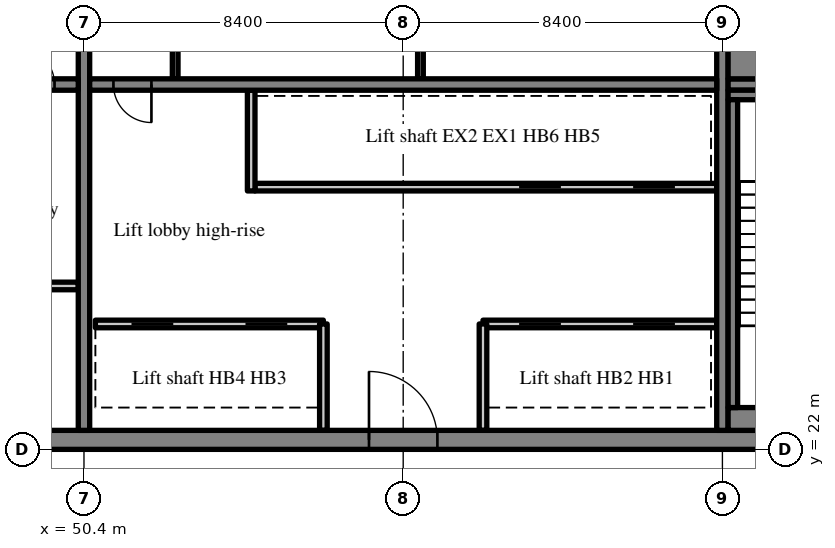
"""IFC4 building model, lengths in metres.
Left out: names, types, materials, properties, quantities, classifications, styles, units other than length and angle.
Written with IfcOpenShell. Run it as: python <this file> out.ifc"""

import sys

from ifc_helpers import new_model, si_unit, direction, frame, frame_2d, origin, place, context, subcontext, project, spatial, rectangle, extrude, source, transform, mapped, element, fill, save


model = new_model("IFC4")
c1 = context("Model", 3, precision=1e-05, world=origin(), true_north=direction((0.0, 1.0)))
c2 = subcontext(c1, "Body", "Model", "MODEL_VIEW")
j1 = project(units=[si_unit("LENGTHUNIT", "METRE"), si_unit("PLANEANGLEUNIT", "RADIAN")], contexts=[c1])
p1 = place(None, origin())
s1 = spatial("IfcSite", under=j1, at=p1, CompositionType="ELEMENT")
p2 = place(p1, origin())
s2 = spatial("IfcBuilding", under=s1, at=p2, CompositionType="ELEMENT")
p3 = place(p2, frame((0.0, 0.0, 277.7)))
s3 = spatial("IfcBuildingStorey", under=s2, at=p3, CompositionType="ELEMENT", Elevation=277.7)
m1 = source(origin(), c2, "Body", "SweptSolid", [
    extrude(rectangle(XDim=50.4, YDim=0.5, at=frame_2d((25.2, 0.0))), origin(), (0.0, 0.0, 1.0), 3.72),
])
p4 = place(p3, frame((25.2, 22.25, 0.0), z_axis=(0.0, 0.0, 1.0), x_axis=(1.0, 0.0, 0.0)))
e1 = element("IfcWall", 1, at=p4, inside=s3, PredefinedType="SHEAR", context=c2, shape_type="MappedRepresentation", body=[
    mapped(m1, transform((0.0, 0.0, 0.0), scale=1.0)),
])
m2 = source(origin(), c2, "Body", "SweptSolid", [
    extrude(rectangle(XDim=1.8, YDim=2.1, at=frame_2d((0.9, 1.05))), frame((0.0, 0.26, 0.0), z_axis=(0.0, -1.0, 0.0), x_axis=(1.0, 0.0, 0.0)), (0.0, 0.0, 1.0), 0.52),
])
p5 = place(p4, frame((15.9, 0.0, 0.0)))
e2 = element("IfcOpeningElement", 2, at=p5, cuts=e1, PredefinedType="OPENING", context=c2, shape_type="MappedRepresentation", body=[
    mapped(m2, transform((0.0, 0.0, 0.0), scale=1.0)),
])
m3 = source(origin(), c2, "Body", "SweptSolid", [
    extrude(rectangle(XDim=0.9, YDim=2.1, at=frame_2d((0.45, 1.05))), frame((0.0, 0.26, 0.0), z_axis=(0.0, -1.0, 0.0), x_axis=(1.0, 0.0, 0.0)), (0.0, 0.0, 1.0), 0.52),
])
p6 = place(p4, frame((21.525, 0.0, 0.0)))
e3 = element("IfcOpeningElement", 3, at=p6, cuts=e1, PredefinedType="OPENING", context=c2, shape_type="MappedRepresentation", body=[
    mapped(m3, transform((0.0, 0.0, 0.0), scale=1.0)),
])
p7 = place(p4, frame((32.7, 0.0, 0.0)))
e4 = element("IfcOpeningElement", 4, at=p7, cuts=e1, PredefinedType="OPENING", context=c2, shape_type="MappedRepresentation", body=[
    mapped(m2, transform((0.0, 0.0, 0.0), scale=1.0)),
])
m4 = source(origin(), c2, "Body", "SweptSolid", [
    extrude(rectangle(XDim=1.2, YDim=2.1, at=frame_2d((0.6, 1.05))), frame((0.0, 0.26, 0.0), z_axis=(0.0, -1.0, 0.0), x_axis=(1.0, 0.0, 0.0)), (0.0, 0.0, 1.0), 0.52),
])
p8 = place(p4, frame((6.5, 0.0, 0.0)))
e5 = element("IfcOpeningElement", 5, at=p8, cuts=e1, PredefinedType="OPENING", context=c2, shape_type="MappedRepresentation", body=[
    mapped(m4, transform((0.0, 0.0, 0.0), scale=1.0)),
])
p9 = place(p4, frame((47.975, 0.0, 0.0)))
e6 = element("IfcOpeningElement", 6, at=p9, cuts=e1, PredefinedType="OPENING", context=c2, shape_type="MappedRepresentation", body=[
    mapped(m4, transform((0.0, 0.0, 0.0), scale=1.0)),
])
m5 = source(origin(), c2, "Body", "SweptSolid", [
    extrude(rectangle(XDim=19.0, YDim=0.3, at=frame_2d((9.5, 0.0))), origin(), (0.0, 0.0, 1.0), 3.72),
])
p10 = place(p3, frame((50.4, 22.5, 0.0), z_axis=(0.0, 0.0, 1.0), x_axis=(0.0, 1.0, 0.0)))
e7 = element("IfcWall", 7, at=p10, inside=s3, PredefinedType="SHEAR", context=c2, shape_type="MappedRepresentation", body=[
    mapped(m5, transform((0.0, 0.0, 0.0), scale=1.0)),
])
m6 = source(origin(), c2, "Body", "SweptSolid", [
    extrude(rectangle(XDim=1.1, YDim=2.1, at=frame_2d((0.55, 1.05))), frame((0.0, 0.16, 0.0), z_axis=(0.0, -1.0, 0.0), x_axis=(1.0, 0.0, 0.0)), (0.0, 0.0, 1.0), 0.32),
])
p11 = place(p10, frame((12.95, 0.0, 0.0)))
e8 = element("IfcOpeningElement", 8, at=p11, cuts=e7, PredefinedType="OPENING", context=c2, shape_type="MappedRepresentation", body=[
    mapped(m6, transform((0.0, 0.0, 0.0), scale=1.0)),
])
p12 = place(p3, frame((67.2, 22.5, 0.0), z_axis=(0.0, 0.0, 1.0), x_axis=(0.0, 1.0, 0.0)))
e9 = element("IfcWall", 9, at=p12, inside=s3, PredefinedType="SHEAR", context=c2, shape_type="MappedRepresentation", body=[
    mapped(m5, transform((0.0, 0.0, 0.0), scale=1.0)),
])
m7 = source(origin(), c2, "Body", "SweptSolid", [
    extrude(rectangle(XDim=16.5, YDim=0.3, at=frame_2d((8.25, 0.0))), origin(), (0.0, 0.0, 1.0), 3.72),
])
p13 = place(p3, frame((33.75, 31.6, 0.0), z_axis=(0.0, 0.0, 1.0), x_axis=(1.0, 0.0, 0.0)))
e10 = element("IfcWall", 10, at=p13, inside=s3, PredefinedType="SHEAR", context=c2, shape_type="MappedRepresentation", body=[
    mapped(m7, transform((0.0, 0.0, 0.0), scale=1.0)),
])
m8 = source(origin(), c2, "Body", "SweptSolid", [
    extrude(rectangle(XDim=1.0, YDim=2.1, at=frame_2d((0.5, 1.05))), frame((0.0, 0.16, 0.0), z_axis=(0.0, -1.0, 0.0), x_axis=(1.0, 0.0, 0.0)), (0.0, 0.0, 1.0), 0.32),
])
p14 = place(p13, frame((14.875, 0.0, 0.0)))
e11 = element("IfcOpeningElement", 11, at=p14, cuts=e10, PredefinedType="OPENING", context=c2, shape_type="MappedRepresentation", body=[
    mapped(m8, transform((0.0, 0.0, 0.0), scale=1.0)),
])
p15 = place(p3, frame((50.55, 31.6, 0.0), z_axis=(0.0, 0.0, 1.0), x_axis=(1.0, 0.0, 0.0)))
e12 = element("IfcWall", 12, at=p15, inside=s3, PredefinedType="SHEAR", context=c2, shape_type="MappedRepresentation", body=[
    mapped(m7, transform((0.0, 0.0, 0.0), scale=1.0)),
])
p16 = place(p15, frame((0.625, 0.0, 0.0)))
e13 = element("IfcOpeningElement", 13, at=p16, cuts=e12, PredefinedType="OPENING", context=c2, shape_type="MappedRepresentation", body=[
    mapped(m8, transform((0.0, 0.0, 0.0), scale=1.0)),
])
m9 = source(origin(), c2, "Body", "SweptSolid", [
    extrude(rectangle(XDim=7.75, YDim=0.3, at=frame_2d((3.875, 0.0))), origin(), (0.0, 0.0, 1.0), 3.72),
])
p17 = place(p3, frame((67.35, 31.6, 0.0), z_axis=(0.0, 0.0, 1.0), x_axis=(1.0, 0.0, 0.0)))
e14 = element("IfcWall", 14, at=p17, inside=s3, PredefinedType="SHEAR", context=c2, shape_type="MappedRepresentation", body=[
    mapped(m9, transform((0.0, 0.0, 0.0), scale=1.0)),
])
p18 = place(p17, frame((5.875, 0.0, 0.0)))
e15 = element("IfcOpeningElement", 15, at=p18, cuts=e14, PredefinedType="OPENING", context=c2, shape_type="MappedRepresentation", body=[
    mapped(m6, transform((0.0, 0.0, 0.0), scale=1.0)),
])
m10 = source(origin(), c2, "Body", "SweptSolid", [
    extrude(rectangle(XDim=6.15, YDim=0.2, at=frame_2d((3.075, 0.0))), origin(), (0.0, 0.0, 1.0), 3.72),
])
p19 = place(p3, frame((44.1, 26.3, 0.0), z_axis=(0.0, 0.0, 1.0), x_axis=(1.0, 0.0, 0.0)))
e16 = element("IfcWall", 16, at=p19, inside=s3, PredefinedType="PARTITIONING", context=c2, shape_type="MappedRepresentation", body=[
    mapped(m10, transform((0.0, 0.0, 0.0), scale=1.0)),
])
m11 = source(origin(), c2, "Body", "SweptSolid", [
    extrude(rectangle(XDim=6.15, YDim=0.2, at=frame_2d((3.075, 0.0))), origin(), (0.0, 0.0, 1.0), 3.72),
])
p20 = place(p3, frame((67.05, 25.3, 0.0), z_axis=(0.0, 0.0, 1.0), x_axis=(-1.0, 0.0, 0.0)))
e17 = element("IfcWall", 17, at=p20, inside=s3, PredefinedType="SOLIDWALL", context=c2, shape_type="MappedRepresentation", body=[
    mapped(m11, transform((0.0, 0.0, 0.0), scale=1.0)),
])
m12 = source(origin(), c2, "Body", "SweptSolid", [
    extrude(rectangle(XDim=1.1, YDim=2.1, at=frame_2d((0.55, 1.05))), frame((0.0, 0.11, 0.0), z_axis=(0.0, -1.0, 0.0), x_axis=(1.0, 0.0, 0.0)), (0.0, 0.0, 1.0), 0.22),
])
p21 = place(p20, frame((1.1, 0.0, 0.0)))
e18 = element("IfcOpeningElement", 18, at=p21, cuts=e17, PredefinedType="OPENING", context=c2, shape_type="MappedRepresentation", body=[
    mapped(m12, transform((0.0, 0.0, 0.0), scale=1.0)),
])
p22 = place(p20, frame((4.1, 0.0, 0.0)))
e19 = element("IfcOpeningElement", 19, at=p22, cuts=e17, PredefinedType="OPENING", context=c2, shape_type="MappedRepresentation", body=[
    mapped(m12, transform((0.0, 0.0, 0.0), scale=1.0)),
])
m13 = source(origin(), c2, "Body", "SweptSolid", [
    extrude(rectangle(XDim=6.0, YDim=0.2, at=frame_2d((3.0, 0.0))), origin(), (0.0, 0.0, 1.0), 3.72),
])
p23 = place(p3, frame((56.7, 25.3, 0.0), z_axis=(0.0, 0.0, 1.0), x_axis=(-1.0, 0.0, 0.0)))
e20 = element("IfcWall", 20, at=p23, inside=s3, PredefinedType="SOLIDWALL", context=c2, shape_type="MappedRepresentation", body=[
    mapped(m13, transform((0.0, 0.0, 0.0), scale=1.0)),
])
p24 = place(p23, frame((0.95, 0.0, 0.0)))
e21 = element("IfcOpeningElement", 21, at=p24, cuts=e20, PredefinedType="OPENING", context=c2, shape_type="MappedRepresentation", body=[
    mapped(m12, transform((0.0, 0.0, 0.0), scale=1.0)),
])
p25 = place(p23, frame((3.95, 0.0, 0.0)))
e22 = element("IfcOpeningElement", 22, at=p25, cuts=e20, PredefinedType="OPENING", context=c2, shape_type="MappedRepresentation", body=[
    mapped(m12, transform((0.0, 0.0, 0.0), scale=1.0)),
])
m14 = source(origin(), c2, "Body", "SweptSolid", [
    extrude(rectangle(XDim=12.15, YDim=0.2, at=frame_2d((6.075, 0.0))), origin(), (0.0, 0.0, 1.0), 3.72),
])
p26 = place(p3, frame((67.05, 28.9, 0.0), z_axis=(0.0, 0.0, 1.0), x_axis=(-1.0, 0.0, 0.0)))
e23 = element("IfcWall", 23, at=p26, inside=s3, PredefinedType="SOLIDWALL", context=c2, shape_type="MappedRepresentation", body=[
    mapped(m14, transform((0.0, 0.0, 0.0), scale=1.0)),
])
p27 = place(p26, frame((1.1, 0.0, 0.0)))
e24 = element("IfcOpeningElement", 24, at=p27, cuts=e23, PredefinedType="OPENING", context=c2, shape_type="MappedRepresentation", body=[
    mapped(m12, transform((0.0, 0.0, 0.0), scale=1.0)),
])
p28 = place(p26, frame((4.1, 0.0, 0.0)))
e25 = element("IfcOpeningElement", 25, at=p28, cuts=e23, PredefinedType="OPENING", context=c2, shape_type="MappedRepresentation", body=[
    mapped(m12, transform((0.0, 0.0, 0.0), scale=1.0)),
])
m15 = source(origin(), c2, "Body", "SweptSolid", [
    extrude(rectangle(XDim=2.8, YDim=0.2, at=frame_2d((1.4, 0.0))), origin(), (0.0, 0.0, 1.0), 3.72),
])
for number, where, z_axis, x_axis in (
    (26, (60.9, 22.5, 0.0), (0.0, 0.0, 1.0), (0.0, 1.0, 0.0)),
    (27, (56.7, 22.5, 0.0), (0.0, 0.0, 1.0), (0.0, 1.0, 0.0)),
):
    element("IfcWall", number, at=place(p3, frame(where, z_axis=z_axis, x_axis=x_axis)), inside=s3, PredefinedType="SOLIDWALL", context=c2, shape_type="MappedRepresentation", body=[
        mapped(m15, transform((0.0, 0.0, 0.0), scale=1.0)),
    ])
m16 = source(origin(), c2, "Body", "SweptSolid", [
    extrude(rectangle(XDim=2.65, YDim=0.2, at=frame_2d((1.325, 0.0))), origin(), (0.0, 0.0, 1.0), 3.72),
])
p29 = place(p3, frame((54.8, 28.8, 0.0), z_axis=(0.0, 0.0, 1.0), x_axis=(0.0, 1.0, 0.0)))
e28 = element("IfcWall", 28, at=p29, inside=s3, PredefinedType="SOLIDWALL", context=c2, shape_type="MappedRepresentation", body=[
    mapped(m16, transform((0.0, 0.0, 0.0), scale=1.0)),
])
m17 = source(origin(), c2, "Body", "SweptSolid", [
    extrude(rectangle(XDim=3.25, YDim=0.15, at=frame_2d((1.625, 0.0))), origin(), (0.0, 0.0, 1.0), 3.72),
])
for number, where, z_axis, x_axis in (
    (29, (52.8, 31.75, 0.0), (0.0, 0.0, 1.0), (0.0, 1.0, 0.0)),
    (30, (59.254, 31.75, 0.0), (0.0, 0.0, 1.0), (0.0, 1.0, 0.0)),
):
    element("IfcWall", number, at=place(p3, frame(where, z_axis=z_axis, x_axis=x_axis)), inside=s3, PredefinedType="PARTITIONING", context=c2, shape_type="MappedRepresentation", body=[
        mapped(m17, transform((0.0, 0.0, 0.0), scale=1.0)),
    ])
m18 = source(origin(), c2, "Body", "SweptSolid", [
    extrude(rectangle(XDim=4.9, YDim=0.6, at=frame_2d((2.45, 0.0))), origin(), (0.0, 0.0, 1.0), 3.72),
])
p30 = place(p3, frame((67.35, 22.8, 0.0), z_axis=(0.0, 0.0, 1.0), x_axis=(1.0, 0.0, 0.0)))
e31 = element("IfcWall", 31, at=p30, inside=s3, PredefinedType="SOLIDWALL", context=c2, shape_type="MappedRepresentation", body=[
    mapped(m18, transform((0.0, 0.0, 0.0), scale=1.0)),
])
m19 = source(origin(), c2, "Body", "SweptSolid", [
    extrude(rectangle(XDim=4.9, YDim=0.25, at=frame_2d((2.45, 0.0))), origin(), (0.0, 0.0, 1.0), 3.72),
])
p31 = place(p3, frame((67.35, 31.325, 0.0), z_axis=(0.0, 0.0, 1.0), x_axis=(1.0, 0.0, 0.0)))
e32 = element("IfcWall", 32, at=p31, inside=s3, PredefinedType="SOLIDWALL", context=c2, shape_type="MappedRepresentation", body=[
    mapped(m19, transform((0.0, 0.0, 0.0), scale=1.0)),
])
m20 = source(origin(), c2, "Body", "SweptSolid", [
    extrude(rectangle(XDim=8.1, YDim=0.25, at=frame_2d((4.05, 0.0))), origin(), (0.0, 0.0, 1.0), 3.72),
])
p32 = place(p3, frame((67.475, 23.1, 0.0), z_axis=(0.0, 0.0, 1.0), x_axis=(0.0, 1.0, 0.0)))
e33 = element("IfcWall", 33, at=p32, inside=s3, PredefinedType="SOLIDWALL", context=c2, shape_type="MappedRepresentation", body=[
    mapped(m20, transform((0.0, 0.0, 0.0), scale=1.0)),
])
m21 = source(origin(), c2, "Body", "SweptSolid", [
    extrude(rectangle(XDim=4.9, YDim=1.05, at=frame_2d((2.45, 0.0))), origin(), (0.0, 0.0, 1.0), 3.72),
])
p33 = place(p3, frame((67.35, 32.275, 0.0), z_axis=(0.0, 0.0, 1.0), x_axis=(1.0, 0.0, 0.0)))
e34 = element("IfcWall", 34, at=p33, inside=s3, PredefinedType="SOLIDWALL", context=c2, shape_type="MappedRepresentation", body=[
    mapped(m21, transform((0.0, 0.0, 0.0), scale=1.0)),
])
m22 = source(origin(), c2, "Body", "SweptSolid", [
    extrude(rectangle(XDim=1.0, YDim=2.1, at=frame_2d((0.5, 1.05))), frame((0.0, 0.025, 0.0), z_axis=(0.0, -1.0, 0.0), x_axis=(1.0, 0.0, 0.0)), (0.0, 0.0, 1.0), 0.05),
])
p34 = place(p14, origin())
e35 = element("IfcDoor", 35, at=p34, inside=s3, OperationType="SINGLE_SWING_LEFT", PredefinedType="DOOR", context=c2, shape_type="MappedRepresentation", body=[
    mapped(m22, transform((0.0, 0.0, 0.0), scale=1.0)),
])
fill(e11, e35)
m23 = source(origin(), c2, "Body", "SweptSolid", [
    extrude(rectangle(XDim=1.8, YDim=2.1, at=frame_2d((0.9, 1.05))), frame((0.0, 0.175, 0.0), z_axis=(0.0, -1.0, 0.0), x_axis=(1.0, 0.0, 0.0)), (0.0, 0.0, 1.0), 0.05),
])
p35 = place(p7, origin())
e36 = element("IfcDoor", 36, at=p35, inside=s3, OperationType="DOUBLE_DOOR_SINGLE_SWING", PredefinedType="DOOR", context=c2, shape_type="MappedRepresentation", body=[
    mapped(m23, transform((0.0, 0.0, 0.0), scale=1.0)),
])
fill(e4, e36)
p36 = place(p16, origin())
e37 = element("IfcDoor", 37, at=p36, inside=s3, OperationType="SINGLE_SWING_RIGHT", PredefinedType="DOOR", context=c2, shape_type="MappedRepresentation", body=[
    mapped(m22, transform((0.0, 0.0, 0.0), scale=1.0)),
])
fill(e13, e37)
m24 = source(origin(), c2, "Body", "SweptSolid", [
    extrude(rectangle(XDim=1.1, YDim=2.1, at=frame_2d((0.55, 1.05))), frame((0.0, 0.025, 0.0), z_axis=(0.0, -1.0, 0.0), x_axis=(1.0, 0.0, 0.0)), (0.0, 0.0, 1.0), 0.05),
])
p37 = place(p21, origin())
e38 = element("IfcDoor", 38, at=p37, inside=s3, OperationType="SLIDING_TO_RIGHT", PredefinedType="DOOR", context=c2, shape_type="MappedRepresentation", body=[
    mapped(m24, transform((0.0, 0.0, 0.0), scale=1.0)),
])
fill(e18, e38)
p38 = place(p22, origin())
e39 = element("IfcDoor", 39, at=p38, inside=s3, OperationType="SLIDING_TO_LEFT", PredefinedType="DOOR", context=c2, shape_type="MappedRepresentation", body=[
    mapped(m24, transform((0.0, 0.0, 0.0), scale=1.0)),
])
fill(e19, e39)
p39 = place(p24, origin())
e40 = element("IfcDoor", 40, at=p39, inside=s3, OperationType="SLIDING_TO_RIGHT", PredefinedType="DOOR", context=c2, shape_type="MappedRepresentation", body=[
    mapped(m24, transform((0.0, 0.0, 0.0), scale=1.0)),
])
fill(e21, e40)
p40 = place(p25, origin())
e41 = element("IfcDoor", 41, at=p40, inside=s3, OperationType="SLIDING_TO_LEFT", PredefinedType="DOOR", context=c2, shape_type="MappedRepresentation", body=[
    mapped(m24, transform((0.0, 0.0, 0.0), scale=1.0)),
])
fill(e22, e41)
p41 = place(p27, origin())
e42 = element("IfcDoor", 42, at=p41, inside=s3, OperationType="SLIDING_TO_RIGHT", PredefinedType="DOOR", context=c2, shape_type="MappedRepresentation", body=[
    mapped(m24, transform((0.0, 0.0, 0.0), scale=1.0)),
])
fill(e24, e42)
p42 = place(p28, origin())
e43 = element("IfcDoor", 43, at=p42, inside=s3, OperationType="SLIDING_TO_LEFT", PredefinedType="DOOR", context=c2, shape_type="MappedRepresentation", body=[
    mapped(m24, transform((0.0, 0.0, 0.0), scale=1.0)),
])
fill(e25, e43)
save(model, sys.argv[1])
